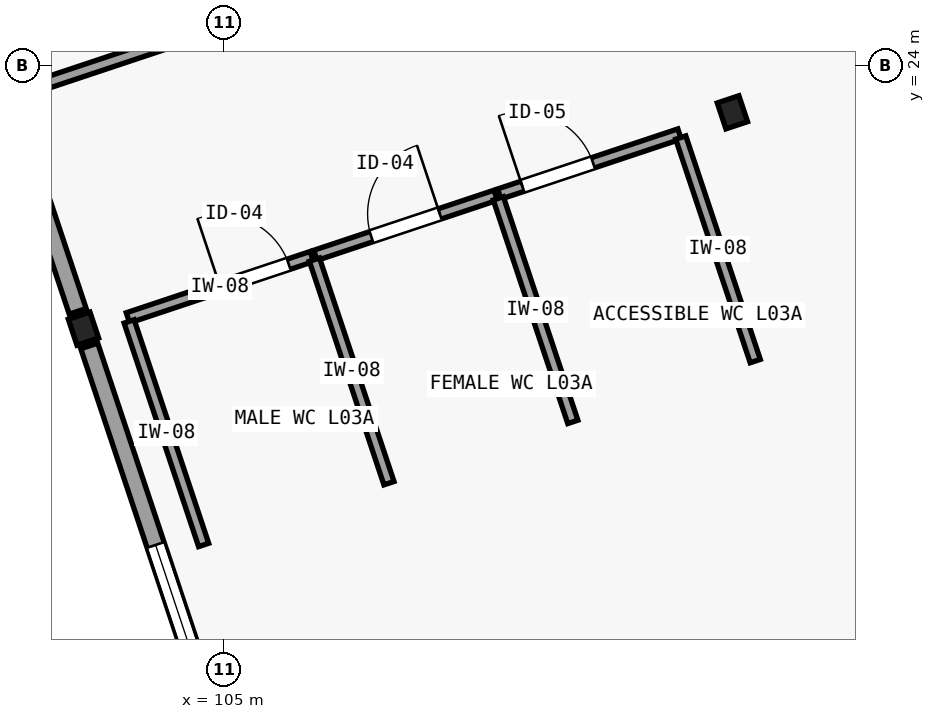
"""IFC4 building model, lengths in metres.
Left out: names, types, materials, properties, quantities, classifications, styles, units other than length and angle.
Written with IfcOpenShell. Run it as: python <this file> out.ifc"""

import sys

from ifc_helpers import new_model, si_unit, direction, frame, frame_2d, origin, origin_2d, place, context, subcontext, project, spatial, rectangle, i_section, extrude, element, fill, save


model = new_model("IFC4")
c1 = context("Model", 3, precision=1e-05, world=origin(), true_north=direction((0.0, 1.0)))
c2 = subcontext(c1, "Body", "Model", "MODEL_VIEW")
j1 = project(units=[si_unit("LENGTHUNIT", "METRE"), si_unit("PLANEANGLEUNIT", "RADIAN")], contexts=[c1])
p1 = place(None, origin())
s1 = spatial("IfcSite", under=j1, at=p1, CompositionType="ELEMENT")
p2 = place(p1, origin())
s2 = spatial("IfcBuilding", under=s1, at=p2, CompositionType="ELEMENT")
p3 = place(p2, frame((0.0, 0.0, 9.9)))
s3 = spatial("IfcBuildingStorey", under=s2, at=p3, CompositionType="ELEMENT", Elevation=9.9)
for number, where, z_axis, x_axis in (
    (1, (103.154, 20.538, 0.0), (0.0, 0.0, 1.0), (0.949, 0.316, 0.0)),
    (2, (111.692, 23.384, 0.0), (0.0, 0.0, 1.0), (0.949, 0.316, 0.0)),
):
    element("IfcColumn", number, at=place(p3, frame(where, z_axis=z_axis, x_axis=x_axis)), inside=s3, PredefinedType="COLUMN", context=c2, shape_type="SweptSolid", body=[
        extrude(i_section(OverallWidth=0.3, OverallDepth=0.36, WebThickness=0.012, FlangeThickness=0.022, FilletRadius=0.027, at=origin_2d()), origin(), (0.0, 0.0, 1.0), 4.2),
    ])
p4 = place(p3, frame((105.924, 12.228, 0.0), z_axis=(0.0, 0.0, 1.0), x_axis=(-0.316236362498, 0.948680432514, 0.0)))
e3 = element("IfcWall", 3, at=p4, inside=s3, PredefinedType="SOLIDWALL", context=c2, shape_type="SweptSolid", body=[
    extrude(rectangle(XDim=8.52, YDim=0.235, at=frame_2d((4.26, 0.0))), origin(), (0.0, 0.0, 1.0), 3.64),
])
p5 = place(p4, frame((2.76, 0.0, 1.05)))
e4 = element("IfcOpeningElement", 4, at=p5, cuts=e3, PredefinedType="OPENING", context=c2, shape_type="SweptSolid", body=[
    extrude(rectangle(XDim=3.0, YDim=1.8, at=frame_2d((1.5, 0.9))), frame((0.0, 0.127, 0.0), z_axis=(0.0, -1.0, 0.0), x_axis=(1.0, 0.0, 0.0)), (0.0, 0.0, 1.0), 0.255),
])
p6 = place(p3, frame((103.078, 20.766, 0.0), z_axis=(0.0, 0.0, 1.0), x_axis=(-0.316236362498, 0.948680432514, 0.0)))
e5 = element("IfcWall", 5, at=p6, inside=s3, PredefinedType="SOLIDWALL", context=c2, shape_type="SweptSolid", body=[
    extrude(rectangle(XDim=8.52, YDim=0.235, at=frame_2d((4.26, 0.0))), origin(), (0.0, 0.0, 1.0), 3.64),
])
p7 = place(p6, frame((2.76, 0.0, 1.05)))
e6 = element("IfcOpeningElement", 6, at=p7, cuts=e5, PredefinedType="OPENING", context=c2, shape_type="SweptSolid", body=[
    extrude(rectangle(XDim=3.0, YDim=1.8, at=frame_2d((1.5, 0.9))), frame((0.0, 0.127, 0.0), z_axis=(0.0, -1.0, 0.0), x_axis=(1.0, 0.0, 0.0)), (0.0, 0.0, 1.0), 0.255),
])
p8 = place(p3, frame((103.739, 20.68, 0.0), z_axis=(0.0, 0.0, 1.0), x_axis=(0.948683298051, 0.316227766017, 0.0)))
e7 = element("IfcWall", 7, at=p8, inside=s3, PredefinedType="PARTITIONING", context=c2, shape_type="SweptSolid", body=[
    extrude(rectangle(XDim=2.55, YDim=0.14, at=frame_2d((1.275, 0.0))), origin(), (0.0, 0.0, 1.0), 3.64),
])
p9 = place(p8, frame((1.28, 0.0, 0.0)))
e8 = element("IfcOpeningElement", 8, at=p9, cuts=e7, PredefinedType="OPENING", context=c2, shape_type="SweptSolid", body=[
    extrude(rectangle(XDim=0.95, YDim=2.1, at=frame_2d((0.475, 1.05))), frame((0.0, 0.08, 0.0), z_axis=(0.0, -1.0, 0.0), x_axis=(1.0, 0.0, 0.0)), (0.0, 0.0, 1.0), 0.16),
])
p10 = place(p3, frame((106.206, 21.503, 0.0), z_axis=(0.0, 0.0, 1.0), x_axis=(0.948683298051, 0.316227766017, 0.0)))
e9 = element("IfcWall", 9, at=p10, inside=s3, PredefinedType="PARTITIONING", context=c2, shape_type="SweptSolid", body=[
    extrude(rectangle(XDim=2.5, YDim=0.14, at=frame_2d((1.25, 0.0))), origin(), (0.0, 0.0, 1.0), 3.64),
])
p11 = place(p10, frame((0.775, 0.0, 0.0)))
e10 = element("IfcOpeningElement", 10, at=p11, cuts=e9, PredefinedType="OPENING", context=c2, shape_type="SweptSolid", body=[
    extrude(rectangle(XDim=0.95, YDim=2.1, at=frame_2d((0.475, 1.05))), frame((0.0, 0.08, 0.0), z_axis=(0.0, -1.0, 0.0), x_axis=(1.0, 0.0, 0.0)), (0.0, 0.0, 1.0), 0.16),
])
p12 = place(p3, frame((108.625, 22.309, 0.0), z_axis=(0.0, 0.0, 1.0), x_axis=(0.948683298051, 0.316227766017, 0.0)))
e11 = element("IfcWall", 11, at=p12, inside=s3, PredefinedType="PARTITIONING", context=c2, shape_type="SweptSolid", body=[
    extrude(rectangle(XDim=2.5, YDim=0.14, at=frame_2d((1.25, 0.0))), origin(), (0.0, 0.0, 1.0), 3.64),
])
p13 = place(p12, frame((0.32, 0.0, 0.0)))
e12 = element("IfcOpeningElement", 12, at=p13, cuts=e11, PredefinedType="OPENING", context=c2, shape_type="SweptSolid", body=[
    extrude(rectangle(XDim=0.98, YDim=2.15, at=frame_2d((0.49, 1.075))), frame((0.0, 0.08, 0.0), z_axis=(0.0, -1.0, 0.0), x_axis=(1.0, 0.0, 0.0)), (0.0, 0.0, 1.0), 0.16),
])
for number, where, z_axis, x_axis in (
    (13, (107.173, 18.505, 0.0), (0.0, 0.0, 1.0), (-0.316, 0.949, 0.0)),
    (14, (109.592, 19.311, 0.0), (0.0, 0.0, 1.0), (-0.316, 0.949, 0.0)),
    (15, (104.735, 17.692, 0.0), (0.0, 0.0, 1.0), (-0.316, 0.949, 0.0)),
    (16, (111.992, 20.111, 0.0), (0.0, 0.0, 1.0), (-0.316, 0.949, 0.0)),
):
    element("IfcWall", number, at=place(p3, frame(where, z_axis=z_axis, x_axis=x_axis)), inside=s3, PredefinedType="PARTITIONING", context=c2, shape_type="SweptSolid", body=[
        extrude(rectangle(XDim=3.1, YDim=0.14, at=frame_2d((1.55, 0.0))), origin(), (0.0, 0.0, 1.0), 3.94),
    ])
p14 = place(p3, frame((102.61, 23.751, 0.0), z_axis=(0.0, 0.0, 1.0), x_axis=(0.948682019823, 0.316231600674, 0.0)))
e17 = element("IfcWall", 17, at=p14, inside=s3, PredefinedType="PARTITIONING", context=c2, shape_type="SweptSolid", body=[
    extrude(rectangle(XDim=19.1, YDim=0.15, at=frame_2d((9.55, 0.0))), origin(), (0.0, 0.0, 1.0), 3.64),
])
p15 = place(p14, frame((3.47, 0.0, 0.0)))
e18 = element("IfcOpeningElement", 18, at=p15, cuts=e17, PredefinedType="OPENING", context=c2, shape_type="SweptSolid", body=[
    extrude(rectangle(XDim=1.75, YDim=2.25, at=frame_2d((0.875, 1.125))), frame((0.0, 0.085, 0.0), z_axis=(0.0, -1.0, 0.0), x_axis=(1.0, 0.0, 0.0)), (0.0, 0.0, 1.0), 0.17),
])
p16 = place(p5, origin())
e19 = element("IfcWindow", 19, at=p16, inside=s3, PartitioningType="SINGLE_PANEL", PredefinedType="WINDOW", context=c2, shape_type="SweptSolid", body=[
    extrude(rectangle(XDim=3.0, YDim=1.8, at=frame_2d((1.5, 0.9))), frame((0.0, 0.03, 0.0), z_axis=(0.0, -1.0, 0.0), x_axis=(1.0, 0.0, 0.0)), (0.0, 0.0, 1.0), 0.06),
])
fill(e4, e19)
p17 = place(p9, origin())
e20 = element("IfcDoor", 20, at=p17, inside=s3, OperationType="SINGLE_SWING_LEFT", PredefinedType="DOOR", context=c2, shape_type="SweptSolid", body=[
    extrude(rectangle(XDim=0.95, YDim=2.1, at=frame_2d((0.475, 1.05))), frame((0.0, 0.025, 0.0), z_axis=(0.0, -1.0, 0.0), x_axis=(1.0, 0.0, 0.0)), (0.0, 0.0, 1.0), 0.05),
])
fill(e8, e20)
p18 = place(p11, origin())
e21 = element("IfcDoor", 21, at=p18, inside=s3, OperationType="SINGLE_SWING_RIGHT", PredefinedType="DOOR", context=c2, shape_type="SweptSolid", body=[
    extrude(rectangle(XDim=0.95, YDim=2.1, at=frame_2d((0.475, 1.05))), frame((0.0, 0.025, 0.0), z_axis=(0.0, -1.0, 0.0), x_axis=(1.0, 0.0, 0.0)), (0.0, 0.0, 1.0), 0.05),
])
fill(e10, e21)
p19 = place(p13, origin())
e22 = element("IfcDoor", 22, at=p19, inside=s3, OperationType="SINGLE_SWING_LEFT", PredefinedType="DOOR", context=c2, shape_type="SweptSolid", body=[
    extrude(rectangle(XDim=0.98, YDim=2.15, at=frame_2d((0.49, 1.075))), frame((0.0, 0.025, 0.0), z_axis=(0.0, -1.0, 0.0), x_axis=(1.0, 0.0, 0.0)), (0.0, 0.0, 1.0), 0.05),
])
fill(e12, e22)
save(model, sys.argv[1])
